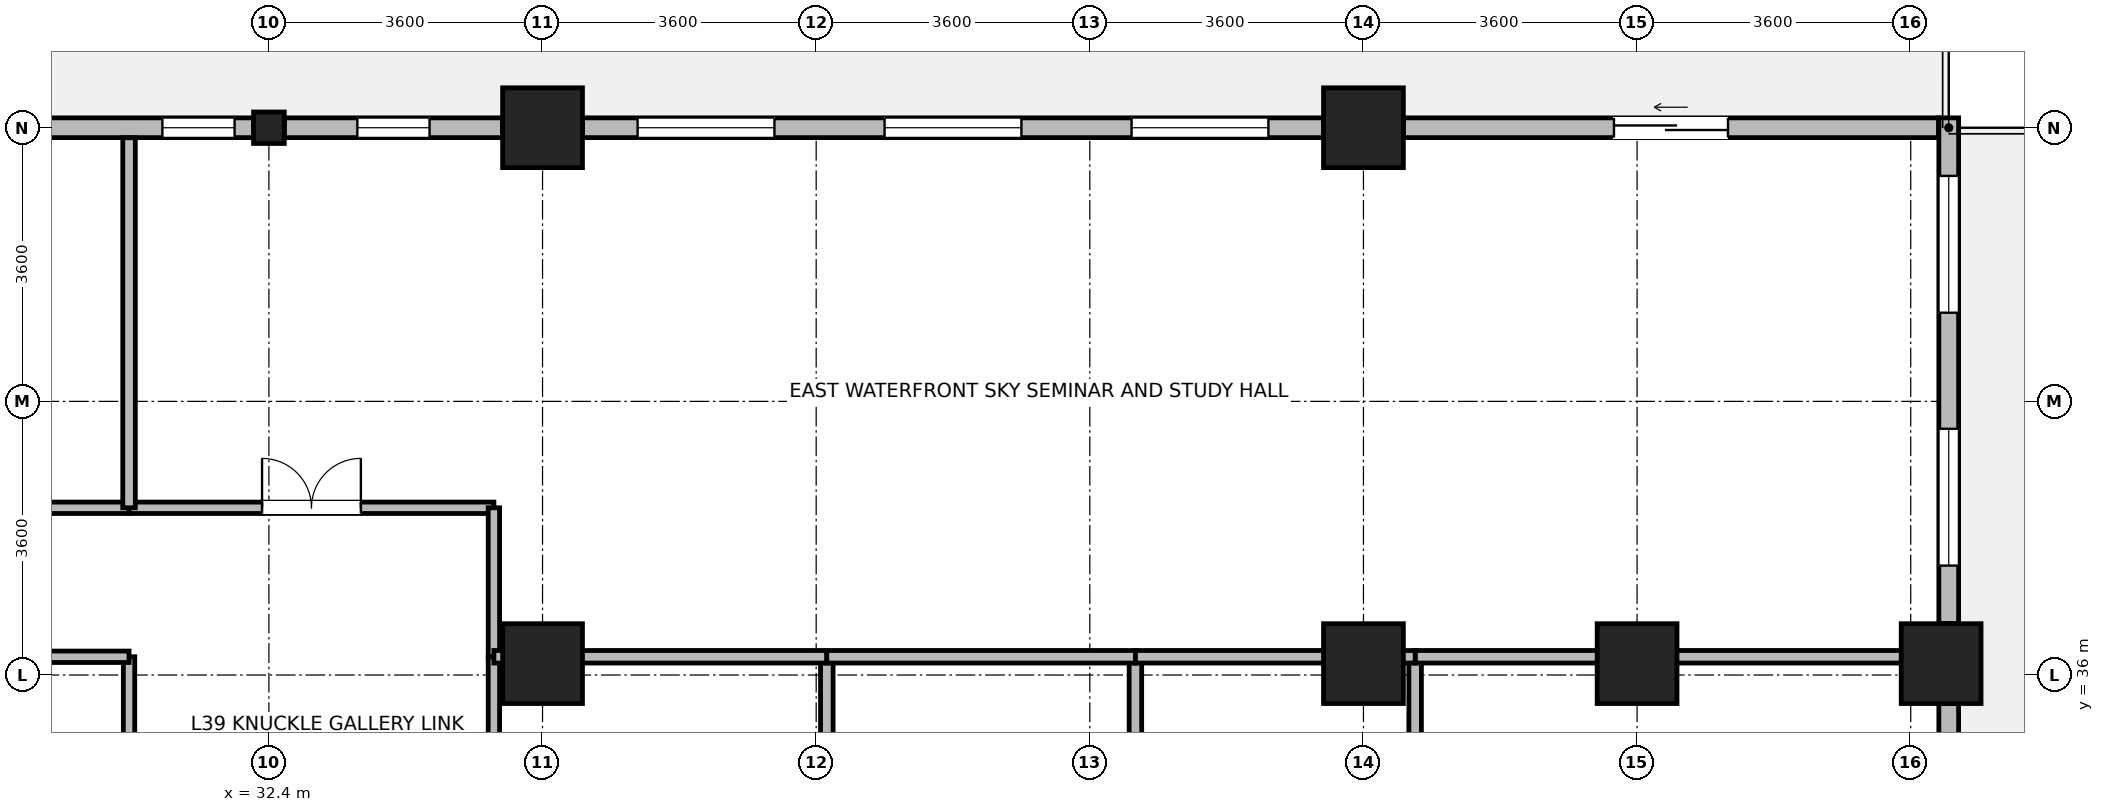
"""IFC4 building model, lengths in metres.
Left out: names, types, materials, properties, quantities, classifications, styles, units other than length and angle.
Written with IfcOpenShell. Run it as: python <this file> out.ifc"""

import sys

from ifc_helpers import new_model, si_unit, direction, frame, frame_2d, origin, origin_2d, place, context, subcontext, project, spatial, rectangle, i_section, extrude, source, transform, mapped, element, fill, save


model = new_model("IFC4")
c1 = context("Model", 3, precision=1e-05, world=origin(), true_north=direction((0.0, 1.0)))
c2 = subcontext(c1, "Body", "Model", "MODEL_VIEW")
j1 = project(units=[si_unit("LENGTHUNIT", "METRE"), si_unit("PLANEANGLEUNIT", "RADIAN")], contexts=[c1])
p1 = place(None, origin())
s1 = spatial("IfcSite", under=j1, at=p1, CompositionType="ELEMENT")
p2 = place(p1, origin())
s2 = spatial("IfcBuilding", under=s1, at=p2, CompositionType="ELEMENT")
p3 = place(p2, frame((0.0, 0.0, 155.0)))
s3 = spatial("IfcBuildingStorey", under=s2, at=p3, CompositionType="ELEMENT", Elevation=155.0)
m1 = source(origin(), c2, "Body", "SweptSolid", [
    extrude(rectangle(XDim=1.05, YDim=1.05, at=origin_2d()), origin(), (0.0, 0.0, 1.0), 3.7),
])
for number, where, z_axis, x_axis in (
    (1, (36.0, 43.2, 0.0), (0.0, 0.0, 1.0), (1.0, 0.0, 0.0)),
    (2, (36.0, 36.15, 0.0), (0.0, 0.0, 1.0), (1.0, 0.0, 0.0)),
    (3, (46.8, 36.15, 0.0), (0.0, 0.0, 1.0), (1.0, 0.0, 0.0)),
    (4, (46.8, 43.2, 0.0), (0.0, 0.0, 1.0), (1.0, 0.0, 0.0)),
    (5, (50.4, 36.15, 0.0), (0.0, 0.0, 1.0), (1.0, 0.0, 0.0)),
    (6, (54.4, 36.15, 0.0), (0.0, 0.0, 1.0), (1.0, 0.0, 0.0)),
):
    element("IfcColumn", number, at=place(p3, frame(where, z_axis=z_axis, x_axis=x_axis)), inside=s3, PredefinedType="COLUMN", context=c2, shape_type="MappedRepresentation", body=[
        mapped(m1, transform((0.0, 0.0, 0.0), x_axis=(1.0, 0.0, 0.0), y_axis=(0.0, 1.0, 0.0), z_axis=(0.0, 0.0, 1.0), scale=1.0)),
    ])
m2 = source(origin(), c2, "Body", "SweptSolid", [
    extrude(i_section(OverallWidth=0.404, OverallDepth=0.414, WebThickness=0.021, FlangeThickness=0.028, FilletRadius=0.015, at=origin_2d()), origin(), (0.0, 0.0, 1.0), 3.7),
])
p4 = place(p3, frame((32.4, 43.2, 0.0), z_axis=(0.0, 0.0, 1.0), x_axis=(1.0, 0.0, 0.0)))
e7 = element("IfcColumn", 7, at=p4, inside=s3, PredefinedType="COLUMN", context=c2, shape_type="MappedRepresentation", body=[
    mapped(m2, transform((0.0, 0.0, 0.0), x_axis=(1.0, 0.0, 0.0), y_axis=(0.0, 1.0, 0.0), z_axis=(0.0, 0.0, 1.0), scale=1.0)),
])
p5 = place(p3, frame((54.5, 35.624, 0.0), z_axis=(0.0, 0.0, 1.0), x_axis=(0.0, -1.0, 0.0)))
e8 = element("IfcWall", 8, at=p5, inside=s3, PredefinedType="STANDARD", context=c2, shape_type="SweptSolid", body=[
    extrude(rectangle(XDim=6.448, YDim=0.26, at=frame_2d((3.224, 0.0))), origin(), (0.0, 0.0, 1.0), 2.99),
])
p6 = place(p5, frame((0.712, 0.0, 0.85)))
e9 = element("IfcOpeningElement", 9, at=p6, cuts=e8, PredefinedType="OPENING", context=c2, shape_type="SweptSolid", body=[
    extrude(rectangle(XDim=1.8, YDim=1.85, at=frame_2d((0.9, 0.925))), frame((0.0, 0.14, 0.0), z_axis=(0.0, -1.0, 0.0), x_axis=(1.0, 0.0, 0.0)), (0.0, 0.0, 1.0), 0.28),
])
p7 = place(p5, frame((3.936, 0.0, 0.85)))
e10 = element("IfcOpeningElement", 10, at=p7, cuts=e8, PredefinedType="OPENING", context=c2, shape_type="SweptSolid", body=[
    extrude(rectangle(XDim=1.8, YDim=1.85, at=frame_2d((0.9, 0.925))), frame((0.0, 0.14, 0.0), z_axis=(0.0, -1.0, 0.0), x_axis=(1.0, 0.0, 0.0)), (0.0, 0.0, 1.0), 0.28),
])
p8 = place(p3, frame((54.5, 43.33, 0.0), z_axis=(0.0, 0.0, 1.0), x_axis=(0.0, -1.0, 0.0)))
e11 = element("IfcWall", 11, at=p8, inside=s3, PredefinedType="STANDARD", context=c2, shape_type="SweptSolid", body=[
    extrude(rectangle(XDim=6.654, YDim=0.26, at=frame_2d((3.327, 0.0))), origin(), (0.0, 0.0, 1.0), 3.44),
])
p9 = place(p8, frame((0.763, 0.0, 0.85)))
e12 = element("IfcOpeningElement", 12, at=p9, cuts=e11, PredefinedType="OPENING", context=c2, shape_type="SweptSolid", body=[
    extrude(rectangle(XDim=1.8, YDim=1.85, at=frame_2d((0.9, 0.925))), frame((0.0, 0.14, 0.0), z_axis=(0.0, -1.0, 0.0), x_axis=(1.0, 0.0, 0.0)), (0.0, 0.0, 1.0), 0.28),
])
p10 = place(p8, frame((4.091, 0.0, 0.85)))
e13 = element("IfcOpeningElement", 13, at=p10, cuts=e11, PredefinedType="OPENING", context=c2, shape_type="SweptSolid", body=[
    extrude(rectangle(XDim=1.8, YDim=1.85, at=frame_2d((0.9, 0.925))), frame((0.0, 0.14, 0.0), z_axis=(0.0, -1.0, 0.0), x_axis=(1.0, 0.0, 0.0)), (0.0, 0.0, 1.0), 0.28),
])
p11 = place(p3, frame((47.326, 43.2, 0.0), z_axis=(0.0, 0.0, 1.0), x_axis=(1.0, 0.0, 0.0)))
e14 = element("IfcWall", 14, at=p11, inside=s3, PredefinedType="STANDARD", context=c2, shape_type="SweptSolid", body=[
    extrude(rectangle(XDim=7.039, YDim=0.26, at=frame_2d((3.52, 0.0))), origin(), (0.0, 0.0, 1.0), 3.44),
])
p12 = place(p11, frame((2.77, 0.0, 0.0)))
e15 = element("IfcOpeningElement", 15, at=p12, cuts=e14, PredefinedType="OPENING", context=c2, shape_type="SweptSolid", body=[
    extrude(rectangle(XDim=1.5, YDim=2.15, at=frame_2d((0.75, 1.075))), frame((0.0, 0.14, 0.0), z_axis=(0.0, -1.0, 0.0), x_axis=(1.0, 0.0, 0.0)), (0.0, 0.0, 1.0), 0.28),
])
p13 = place(p3, frame((36.526, 43.2, 0.0), z_axis=(0.0, 0.0, 1.0), x_axis=(1.0, 0.0, 0.0)))
e16 = element("IfcWall", 16, at=p13, inside=s3, PredefinedType="STANDARD", context=c2, shape_type="SweptSolid", body=[
    extrude(rectangle(XDim=9.748, YDim=0.26, at=frame_2d((4.874, 0.0))), origin(), (0.0, 0.0, 1.0), 2.99),
])
p14 = place(p13, frame((0.725, 0.0, 0.85)))
e17 = element("IfcOpeningElement", 17, at=p14, cuts=e16, PredefinedType="OPENING", context=c2, shape_type="SweptSolid", body=[
    extrude(rectangle(XDim=1.8, YDim=1.85, at=frame_2d((0.9, 0.925))), frame((0.0, 0.14, 0.0), z_axis=(0.0, -1.0, 0.0), x_axis=(1.0, 0.0, 0.0)), (0.0, 0.0, 1.0), 0.28),
])
p15 = place(p13, frame((3.974, 0.0, 0.85)))
e18 = element("IfcOpeningElement", 18, at=p15, cuts=e16, PredefinedType="OPENING", context=c2, shape_type="SweptSolid", body=[
    extrude(rectangle(XDim=1.8, YDim=1.85, at=frame_2d((0.9, 0.925))), frame((0.0, 0.14, 0.0), z_axis=(0.0, -1.0, 0.0), x_axis=(1.0, 0.0, 0.0)), (0.0, 0.0, 1.0), 0.28),
])
p16 = place(p13, frame((7.223, 0.0, 0.85)))
e19 = element("IfcOpeningElement", 19, at=p16, cuts=e16, PredefinedType="OPENING", context=c2, shape_type="SweptSolid", body=[
    extrude(rectangle(XDim=1.8, YDim=1.85, at=frame_2d((0.9, 0.925))), frame((0.0, 0.14, 0.0), z_axis=(0.0, -1.0, 0.0), x_axis=(1.0, 0.0, 0.0)), (0.0, 0.0, 1.0), 0.28),
])
p17 = place(p3, frame((32.603, 43.2, 0.0), z_axis=(0.0, 0.0, 1.0), x_axis=(1.0, 0.0, 0.0)))
e20 = element("IfcWall", 20, at=p17, inside=s3, PredefinedType="STANDARD", context=c2, shape_type="SweptSolid", body=[
    extrude(rectangle(XDim=2.871, YDim=0.26, at=frame_2d((1.436, 0.0))), origin(), (0.0, 0.0, 1.0), 2.99),
])
p18 = place(p17, frame((0.96, 0.0, 0.85)))
e21 = element("IfcOpeningElement", 21, at=p18, cuts=e20, PredefinedType="OPENING", context=c2, shape_type="SweptSolid", body=[
    extrude(rectangle(XDim=0.95, YDim=1.75, at=frame_2d((0.475, 0.875))), frame((0.0, 0.14, 0.0), z_axis=(0.0, -1.0, 0.0), x_axis=(1.0, 0.0, 0.0)), (0.0, 0.0, 1.0), 0.28),
])
p19 = place(p3, frame((29.326, 43.2, 0.0), z_axis=(0.0, 0.0, 1.0), x_axis=(1.0, 0.0, 0.0)))
e22 = element("IfcWall", 22, at=p19, inside=s3, PredefinedType="STANDARD", context=c2, shape_type="SweptSolid", body=[
    extrude(rectangle(XDim=2.871, YDim=0.26, at=frame_2d((1.436, 0.0))), origin(), (0.0, 0.0, 1.0), 2.99),
])
p20 = place(p19, frame((1.673, 0.0, 0.85)))
e23 = element("IfcOpeningElement", 23, at=p20, cuts=e22, PredefinedType="OPENING", context=c2, shape_type="SweptSolid", body=[
    extrude(rectangle(XDim=0.95, YDim=1.75, at=frame_2d((0.475, 0.875))), frame((0.0, 0.14, 0.0), z_axis=(0.0, -1.0, 0.0), x_axis=(1.0, 0.0, 0.0)), (0.0, 0.0, 1.0), 0.28),
])
p21 = place(p3, frame((22.74, 38.2, 0.0), z_axis=(0.0, 0.0, 1.0), x_axis=(1.0, 0.0, 0.0)))
e24 = element("IfcWall", 24, at=p21, inside=s3, PredefinedType="PARTITIONING", context=c2, shape_type="SweptSolid", body=[
    extrude(rectangle(XDim=7.82, YDim=0.15, at=frame_2d((3.91, 0.0))), origin(), (0.0, 0.0, 1.0), 3.44),
])
p22 = place(p21, frame((3.46, 0.0, 0.0)))
e25 = element("IfcOpeningElement", 25, at=p22, cuts=e24, PredefinedType="OPENING", context=c2, shape_type="SweptSolid", body=[
    extrude(rectangle(XDim=0.9, YDim=2.08, at=frame_2d((0.45, 1.04))), frame((0.0, 0.085, 0.0), z_axis=(0.0, -1.0, 0.0), x_axis=(1.0, 0.0, 0.0)), (0.0, 0.0, 1.0), 0.17),
])
p23 = place(p3, frame((35.36, 28.56, 0.0), z_axis=(0.0, 0.0, 1.0), x_axis=(0.0, 1.0, 0.0)))
e26 = element("IfcWall", 26, at=p23, inside=s3, PredefinedType="PARTITIONING", context=c2, shape_type="SweptSolid", body=[
    extrude(rectangle(XDim=7.68, YDim=0.15, at=frame_2d((3.84, 0.0))), origin(), (0.0, 0.0, 1.0), 3.44),
])
p24 = place(p23, frame((3.19, 0.0, 0.0)))
e27 = element("IfcOpeningElement", 27, at=p24, cuts=e26, PredefinedType="OPENING", context=c2, shape_type="SweptSolid", body=[
    extrude(rectangle(XDim=1.3, YDim=2.12, at=frame_2d((0.65, 1.06))), frame((0.0, 0.085, 0.0), z_axis=(0.0, -1.0, 0.0), x_axis=(1.0, 0.0, 0.0)), (0.0, 0.0, 1.0), 0.17),
])
p25 = place(p3, frame((30.56, 38.2, 0.0), z_axis=(0.0, 0.0, 1.0), x_axis=(1.0, 0.0, 0.0)))
e28 = element("IfcWall", 28, at=p25, inside=s3, PredefinedType="PARTITIONING", context=c2, shape_type="SweptSolid", body=[
    extrude(rectangle(XDim=4.8, YDim=0.15, at=frame_2d((2.4, 0.0))), origin(), (0.0, 0.0, 1.0), 3.44),
])
p26 = place(p25, frame((1.75, 0.0, 0.0)))
e29 = element("IfcOpeningElement", 29, at=p26, cuts=e28, PredefinedType="OPENING", context=c2, shape_type="SweptSolid", body=[
    extrude(rectangle(XDim=1.3, YDim=2.12, at=frame_2d((0.65, 1.06))), frame((0.0, 0.085, 0.0), z_axis=(0.0, -1.0, 0.0), x_axis=(1.0, 0.0, 0.0)), (0.0, 0.0, 1.0), 0.17),
])
p27 = place(p3, frame((30.56, 31.64, 0.0), z_axis=(0.0, 0.0, 1.0), x_axis=(0.0, 1.0, 0.0)))
e30 = element("IfcWall", 30, at=p27, inside=s3, PredefinedType="PARTITIONING", context=c2, shape_type="SweptSolid", body=[
    extrude(rectangle(XDim=4.6, YDim=0.15, at=frame_2d((2.3, 0.0))), origin(), (0.0, 0.0, 1.0), 3.44),
])
p28 = place(p27, frame((1.65, 0.0, 0.0)))
e31 = element("IfcOpeningElement", 31, at=p28, cuts=e30, PredefinedType="OPENING", context=c2, shape_type="SweptSolid", body=[
    extrude(rectangle(XDim=1.3, YDim=2.12, at=frame_2d((0.65, 1.06))), frame((0.0, 0.085, 0.0), z_axis=(0.0, -1.0, 0.0), x_axis=(1.0, 0.0, 0.0)), (0.0, 0.0, 1.0), 0.17),
])
p29 = place(p3, frame((35.36, 36.24, 0.0), z_axis=(0.0, 0.0, 1.0), x_axis=(0.0, 1.0, 0.0)))
e32 = element("IfcWall", 32, at=p29, inside=s3, PredefinedType="PARTITIONING", context=c2, shape_type="SweptSolid", body=[
    extrude(rectangle(XDim=1.96, YDim=0.15, at=frame_2d((0.98, 0.0))), origin(), (0.0, 0.0, 1.0), 3.44),
])
p30 = place(p3, frame((29.325, 36.24, 0.0), z_axis=(0.0, 0.0, 1.0), x_axis=(1.0, 0.0, 0.0)))
e33 = element("IfcWall", 33, at=p30, inside=s3, PredefinedType="PARTITIONING", context=c2, shape_type="SweptSolid", body=[
    extrude(rectangle(XDim=1.235, YDim=0.15, at=frame_2d((0.618, 0.0))), origin(), (0.0, 0.0, 1.0), 2.84),
])
for number, where, z_axis, x_axis in (
    (34, (39.74, 28.56, 0.0), (0.0, 0.0, 1.0), (0.0, 1.0, 0.0)),
    (35, (43.8, 28.56, 0.0), (0.0, 0.0, 1.0), (0.0, 1.0, 0.0)),
    (36, (47.48, 28.56, 0.0), (0.0, 0.0, 1.0), (0.0, 1.0, 0.0)),
):
    element("IfcWall", number, at=place(p3, frame(where, z_axis=z_axis, x_axis=x_axis)), inside=s3, PredefinedType="PARTITIONING", context=c2, shape_type="SweptSolid", body=[
        extrude(rectangle(XDim=7.68, YDim=0.165, at=frame_2d((3.84, 0.0))), origin(), (0.0, 0.0, 1.0), 3.44),
    ])
p31 = place(p3, frame((47.48, 36.24, 0.0), z_axis=(0.0, 0.0, 1.0), x_axis=(1.0, 0.0, 0.0)))
e37 = element("IfcWall", 37, at=p31, inside=s3, PredefinedType="PARTITIONING", context=c2, shape_type="SweptSolid", body=[
    extrude(rectangle(XDim=6.888, YDim=0.165, at=frame_2d((3.444, 0.0))), origin(), (0.0, 0.0, 1.0), 2.84),
])
p32 = place(p3, frame((30.56, 38.2, 0.0), z_axis=(0.0, 0.0, 1.0), x_axis=(0.0, 1.0, 0.0)))
e38 = element("IfcWall", 38, at=p32, inside=s3, PredefinedType="PARTITIONING", context=c2, shape_type="SweptSolid", body=[
    extrude(rectangle(XDim=4.868, YDim=0.165, at=frame_2d((2.434, 0.0))), origin(), (0.0, 0.0, 1.0), 3.44),
])
p33 = place(p3, frame((35.36, 36.24, 0.0), z_axis=(0.0, 0.0, 1.0), x_axis=(1.0, 0.0, 0.0)))
e39 = element("IfcWall", 39, at=p33, inside=s3, PredefinedType="PARTITIONING", context=c2, shape_type="SweptSolid", body=[
    extrude(rectangle(XDim=4.38, YDim=0.165, at=frame_2d((2.19, 0.0))), origin(), (0.0, 0.0, 1.0), 2.84),
])
p34 = place(p3, frame((39.74, 36.24, 0.0), z_axis=(0.0, 0.0, 1.0), x_axis=(1.0, 0.0, 0.0)))
e40 = element("IfcWall", 40, at=p34, inside=s3, PredefinedType="PARTITIONING", context=c2, shape_type="SweptSolid", body=[
    extrude(rectangle(XDim=4.06, YDim=0.165, at=frame_2d((2.03, 0.0))), origin(), (0.0, 0.0, 1.0), 2.84),
])
p35 = place(p3, frame((43.8, 36.24, 0.0), z_axis=(0.0, 0.0, 1.0), x_axis=(1.0, 0.0, 0.0)))
e41 = element("IfcWall", 41, at=p35, inside=s3, PredefinedType="PARTITIONING", context=c2, shape_type="SweptSolid", body=[
    extrude(rectangle(XDim=3.68, YDim=0.165, at=frame_2d((1.84, 0.0))), origin(), (0.0, 0.0, 1.0), 2.84),
])
p36 = place(p9, origin())
e42 = element("IfcWindow", 42, at=p36, inside=s3, PartitioningType="SINGLE_PANEL", PredefinedType="WINDOW", context=c2, shape_type="SweptSolid", body=[
    extrude(rectangle(XDim=1.8, YDim=1.85, at=frame_2d((0.9, 0.925))), frame((0.0, 0.03, 0.0), z_axis=(0.0, -1.0, 0.0), x_axis=(1.0, 0.0, 0.0)), (0.0, 0.0, 1.0), 0.06),
])
fill(e12, e42)
p37 = place(p10, origin())
e43 = element("IfcWindow", 43, at=p37, inside=s3, PartitioningType="SINGLE_PANEL", PredefinedType="WINDOW", context=c2, shape_type="SweptSolid", body=[
    extrude(rectangle(XDim=1.8, YDim=1.85, at=frame_2d((0.9, 0.925))), frame((0.0, 0.03, 0.0), z_axis=(0.0, -1.0, 0.0), x_axis=(1.0, 0.0, 0.0)), (0.0, 0.0, 1.0), 0.06),
])
fill(e13, e43)
p38 = place(p12, origin())
e44 = element("IfcDoor", 44, at=p38, inside=s3, OperationType="SLIDING_TO_LEFT", PredefinedType="DOOR", context=c2, shape_type="SweptSolid", body=[
    extrude(rectangle(XDim=1.5, YDim=2.15, at=frame_2d((0.75, 1.075))), frame((0.0, 0.025, 0.0), z_axis=(0.0, -1.0, 0.0), x_axis=(1.0, 0.0, 0.0)), (0.0, 0.0, 1.0), 0.05),
])
fill(e15, e44)
p39 = place(p14, origin())
e45 = element("IfcWindow", 45, at=p39, inside=s3, PartitioningType="SINGLE_PANEL", PredefinedType="WINDOW", context=c2, shape_type="SweptSolid", body=[
    extrude(rectangle(XDim=1.8, YDim=1.85, at=frame_2d((0.9, 0.925))), frame((0.0, 0.03, 0.0), z_axis=(0.0, -1.0, 0.0), x_axis=(1.0, 0.0, 0.0)), (0.0, 0.0, 1.0), 0.06),
])
fill(e17, e45)
p40 = place(p15, origin())
e46 = element("IfcWindow", 46, at=p40, inside=s3, PartitioningType="SINGLE_PANEL", PredefinedType="WINDOW", context=c2, shape_type="SweptSolid", body=[
    extrude(rectangle(XDim=1.8, YDim=1.85, at=frame_2d((0.9, 0.925))), frame((0.0, 0.03, 0.0), z_axis=(0.0, -1.0, 0.0), x_axis=(1.0, 0.0, 0.0)), (0.0, 0.0, 1.0), 0.06),
])
fill(e18, e46)
p41 = place(p16, origin())
e47 = element("IfcWindow", 47, at=p41, inside=s3, PartitioningType="SINGLE_PANEL", PredefinedType="WINDOW", context=c2, shape_type="SweptSolid", body=[
    extrude(rectangle(XDim=1.8, YDim=1.85, at=frame_2d((0.9, 0.925))), frame((0.0, 0.03, 0.0), z_axis=(0.0, -1.0, 0.0), x_axis=(1.0, 0.0, 0.0)), (0.0, 0.0, 1.0), 0.06),
])
fill(e19, e47)
p42 = place(p18, origin())
e48 = element("IfcWindow", 48, at=p42, inside=s3, PartitioningType="SINGLE_PANEL", PredefinedType="WINDOW", context=c2, shape_type="SweptSolid", body=[
    extrude(rectangle(XDim=0.95, YDim=1.75, at=frame_2d((0.475, 0.875))), frame((0.0, 0.03, 0.0), z_axis=(0.0, -1.0, 0.0), x_axis=(1.0, 0.0, 0.0)), (0.0, 0.0, 1.0), 0.06),
])
fill(e21, e48)
p43 = place(p20, origin())
e49 = element("IfcWindow", 49, at=p43, inside=s3, PartitioningType="SINGLE_PANEL", PredefinedType="WINDOW", context=c2, shape_type="SweptSolid", body=[
    extrude(rectangle(XDim=0.95, YDim=1.75, at=frame_2d((0.475, 0.875))), frame((0.0, 0.03, 0.0), z_axis=(0.0, -1.0, 0.0), x_axis=(1.0, 0.0, 0.0)), (0.0, 0.0, 1.0), 0.06),
])
fill(e23, e49)
p44 = place(p26, origin())
e50 = element("IfcDoor", 50, at=p44, inside=s3, OperationType="DOUBLE_DOOR_SINGLE_SWING", PredefinedType="DOOR", context=c2, shape_type="SweptSolid", body=[
    extrude(rectangle(XDim=1.3, YDim=2.12, at=frame_2d((0.65, 1.06))), frame((0.0, 0.025, 0.0), z_axis=(0.0, -1.0, 0.0), x_axis=(1.0, 0.0, 0.0)), (0.0, 0.0, 1.0), 0.05),
])
fill(e29, e50)
save(model, sys.argv[1])
